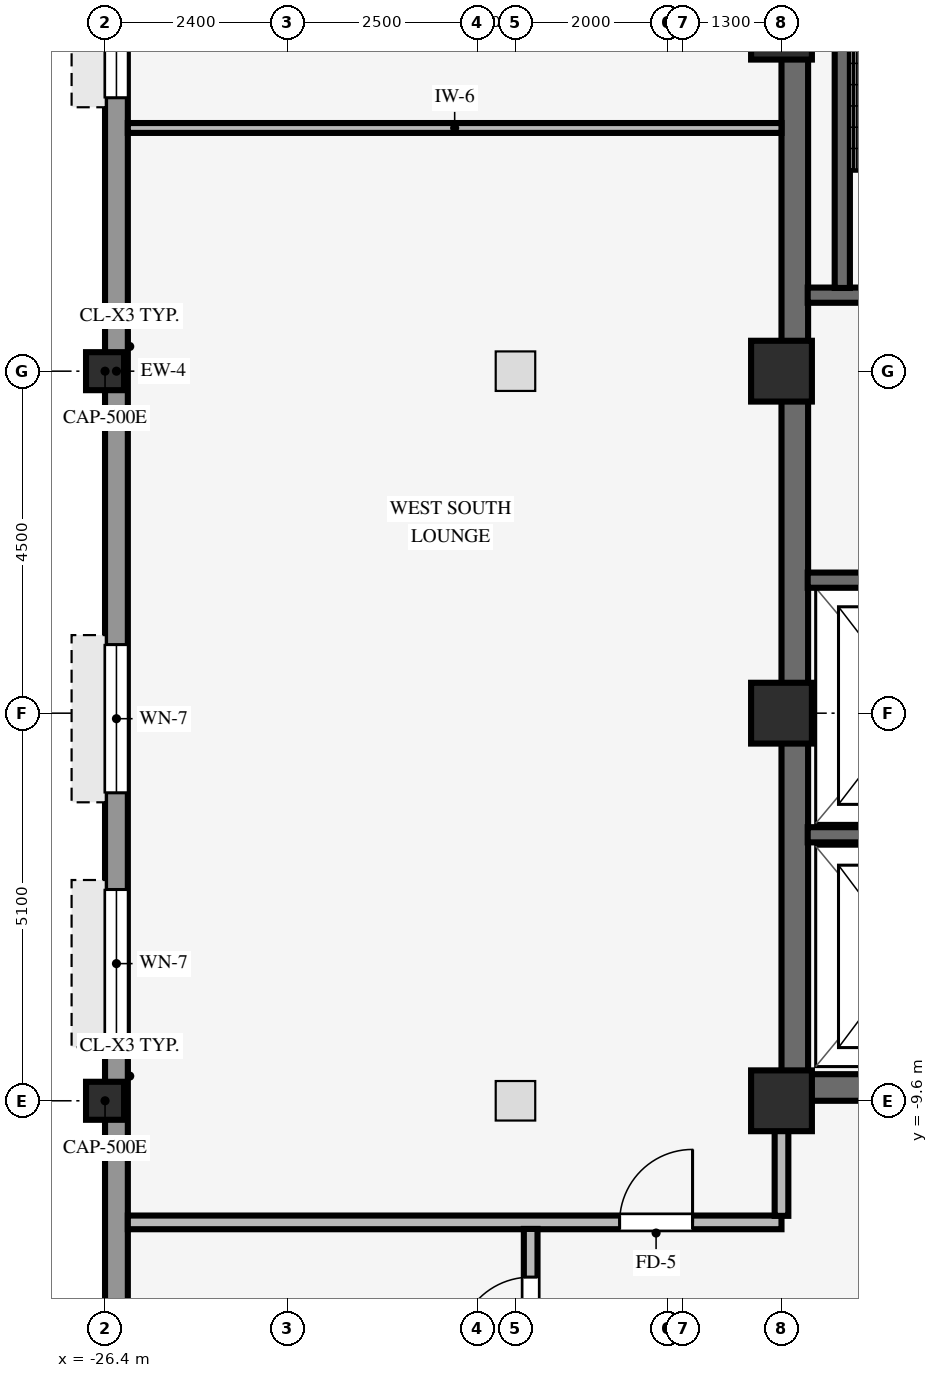
"""IFC4 building model, lengths in metres.
Left out: names, types, materials, properties, quantities, classifications, styles, units other than length and angle.
Written with IfcOpenShell. Run it as: python <this file> out.ifc"""

import sys

from ifc_helpers import new_model, si_unit, direction, frame, frame_2d, origin, origin_2d, place, context, subcontext, project, spatial, rectangle, hollow_rectangle, extrude, source, transform, mapped, element, fill, save


model = new_model("IFC4")
c1 = context("Model", 3, precision=1e-05, world=origin(), true_north=direction((0.0, 1.0)))
c2 = subcontext(c1, "Body", "Model", "MODEL_VIEW")
j1 = project(units=[si_unit("LENGTHUNIT", "METRE"), si_unit("PLANEANGLEUNIT", "RADIAN")], contexts=[c1])
p1 = place(None, origin())
s1 = spatial("IfcSite", under=j1, at=p1, CompositionType="ELEMENT")
p2 = place(p1, origin())
s2 = spatial("IfcBuilding", under=s1, at=p2, CompositionType="ELEMENT")
p3 = place(p2, frame((0.0, 0.0, 242.0)))
s3 = spatial("IfcBuildingStorey", under=s2, at=p3, CompositionType="ELEMENT", Elevation=242.0)
p4 = place(p3, frame((-17.5, -9.425, 0.0), z_axis=(0.0, 0.0, 1.0), x_axis=(1.0, 0.0, 0.0)))
e1 = element("IfcWall", 1, at=p4, inside=s3, PredefinedType="SHEAR", context=c2, shape_type="SweptSolid", body=[
    extrude(rectangle(XDim=8.5, YDim=0.35, at=frame_2d((4.25, 0.0))), origin(), (0.0, 0.0, 1.0), 3.25),
])
p5 = place(p3, frame((-17.325, -9.255, 0.0), z_axis=(0.0, 0.0, 1.0), x_axis=(0.0, 1.0, 0.0)))
e2 = element("IfcWall", 2, at=p5, inside=s3, PredefinedType="SHEAR", context=c2, shape_type="SweptSolid", body=[
    extrude(rectangle(XDim=18.51, YDim=0.35, at=frame_2d((9.255, 0.0))), origin(), (0.0, 0.0, 1.0), 3.25),
])
for number, where, z_axis, x_axis in (
    (3, (-17.5, -9.6, 0.0), (0.0, 0.0, 1.0), (1.0, 0.0, 0.0)),
    (4, (-17.5, -4.5, 0.0), (0.0, 0.0, 1.0), (1.0, 0.0, 0.0)),
    (5, (-17.5, 4.5, 0.0), (0.0, 0.0, 1.0), (1.0, 0.0, 0.0)),
    (6, (-17.5, 0.0, 0.0), (0.0, 0.0, 1.0), (1.0, 0.0, 0.0)),
):
    element("IfcColumn", number, at=place(p3, frame(where, z_axis=z_axis, x_axis=x_axis)), inside=s3, PredefinedType="COLUMN", context=c2, shape_type="SweptSolid", body=[
        extrude(rectangle(XDim=0.8, YDim=0.8, at=origin_2d()), origin(), (0.0, 0.0, 1.0), 3.25),
    ])
for number, where, z_axis, x_axis in (
    (7, (-26.4, -9.6, 0.0), (0.0, 0.0, 1.0), (1.0, 0.0, 0.0)),
    (8, (-26.4, 0.0, 0.0), (0.0, 0.0, 1.0), (1.0, 0.0, 0.0)),
):
    element("IfcColumn", number, at=place(p3, frame(where, z_axis=z_axis, x_axis=x_axis)), inside=s3, PredefinedType="COLUMN", context=c2, shape_type="SweptSolid", body=[
        extrude(hollow_rectangle(XDim=0.5, YDim=0.5, WallThickness=0.032, InnerFilletRadius=0.032, OuterFilletRadius=0.064, at=origin_2d()), origin(), (0.0, 0.0, 1.0), 3.25),
    ])
p6 = place(p3, frame((-26.25, -17.004, 0.0), z_axis=(0.0, 0.0, 1.0), x_axis=(0.0, 1.0, 0.0)))
e9 = element("IfcWall", 9, at=p6, inside=s3, PredefinedType="STANDARD", context=c2, shape_type="SweptSolid", body=[
    extrude(rectangle(XDim=34.008, YDim=0.3, at=frame_2d((17.004, 0.0))), origin(), (0.0, 0.0, 1.0), 2.812),
])
p7 = place(p6, frame((2.311, 0.0, 0.8)))
e10 = element("IfcOpeningElement", 10, at=p7, cuts=e9, PredefinedType="OPENING", context=c2, shape_type="SweptSolid", body=[
    extrude(rectangle(XDim=1.95, YDim=1.48, at=frame_2d((0.975, 0.74))), frame((0.0, 0.16, 0.0), z_axis=(0.0, -1.0, 0.0), x_axis=(1.0, 0.0, 0.0)), (0.0, 0.0, 1.0), 0.32),
])
p8 = place(p6, frame((8.234, 0.0, 0.8)))
e11 = element("IfcOpeningElement", 11, at=p8, cuts=e9, PredefinedType="OPENING", context=c2, shape_type="SweptSolid", body=[
    extrude(rectangle(XDim=1.95, YDim=1.48, at=frame_2d((0.975, 0.74))), frame((0.0, 0.16, 0.0), z_axis=(0.0, -1.0, 0.0), x_axis=(1.0, 0.0, 0.0)), (0.0, 0.0, 1.0), 0.32),
])
p9 = place(p6, frame((11.456, 0.0, 0.8)))
e12 = element("IfcOpeningElement", 12, at=p9, cuts=e9, PredefinedType="OPENING", context=c2, shape_type="SweptSolid", body=[
    extrude(rectangle(XDim=1.95, YDim=1.48, at=frame_2d((0.975, 0.74))), frame((0.0, 0.16, 0.0), z_axis=(0.0, -1.0, 0.0), x_axis=(1.0, 0.0, 0.0)), (0.0, 0.0, 1.0), 0.32),
])
p10 = place(p6, frame((20.602, 0.0, 0.8)))
e13 = element("IfcOpeningElement", 13, at=p10, cuts=e9, PredefinedType="OPENING", context=c2, shape_type="SweptSolid", body=[
    extrude(rectangle(XDim=1.95, YDim=1.48, at=frame_2d((0.975, 0.74))), frame((0.0, 0.16, 0.0), z_axis=(0.0, -1.0, 0.0), x_axis=(1.0, 0.0, 0.0)), (0.0, 0.0, 1.0), 0.32),
])
p11 = place(p6, frame((23.824, 0.0, 0.8)))
e14 = element("IfcOpeningElement", 14, at=p11, cuts=e9, PredefinedType="OPENING", context=c2, shape_type="SweptSolid", body=[
    extrude(rectangle(XDim=1.95, YDim=1.48, at=frame_2d((0.975, 0.74))), frame((0.0, 0.16, 0.0), z_axis=(0.0, -1.0, 0.0), x_axis=(1.0, 0.0, 0.0)), (0.0, 0.0, 1.0), 0.32),
])
p12 = place(p6, frame((29.747, 0.0, 0.8)))
e15 = element("IfcOpeningElement", 15, at=p12, cuts=e9, PredefinedType="OPENING", context=c2, shape_type="SweptSolid", body=[
    extrude(rectangle(XDim=1.95, YDim=1.48, at=frame_2d((0.975, 0.74))), frame((0.0, 0.16, 0.0), z_axis=(0.0, -1.0, 0.0), x_axis=(1.0, 0.0, 0.0)), (0.0, 0.0, 1.0), 0.32),
])
p13 = place(p3, frame((-17.155, 1.0, 0.0), z_axis=(0.0, 0.0, 1.0), x_axis=(1.0, 0.0, 0.0)))
e16 = element("IfcWall", 16, at=p13, inside=s3, PredefinedType="SHEAR", context=c2, shape_type="SweptSolid", body=[
    extrude(rectangle(XDim=3.62, YDim=0.2, at=frame_2d((1.81, 0.0))), origin(), (0.0, 0.0, 1.0), 3.25),
])
p14 = place(p3, frame((-16.7, 1.095, 0.0), z_axis=(0.0, 0.0, 1.0), x_axis=(0.0, 1.0, 0.0)))
e17 = element("IfcWall", 17, at=p14, inside=s3, PredefinedType="SHEAR", context=c2, shape_type="SweptSolid", body=[
    extrude(rectangle(XDim=8.16, YDim=0.2, at=frame_2d((4.08, 0.0))), origin(), (0.0, 0.0, 1.0), 3.25),
])
p15 = place(p3, frame((-17.155, -6.1, 0.0), z_axis=(0.0, 0.0, 1.0), x_axis=(1.0, 0.0, 0.0)))
e18 = element("IfcWall", 18, at=p15, inside=s3, PredefinedType="SHEAR", context=c2, shape_type="SweptSolid", body=[
    extrude(rectangle(XDim=2.905, YDim=0.2, at=frame_2d((1.453, 0.0))), origin(), (0.0, 0.0, 1.0), 3.25),
])
p16 = place(p3, frame((-17.155, -2.75, 0.0), z_axis=(0.0, 0.0, 1.0), x_axis=(1.0, 0.0, 0.0)))
e19 = element("IfcWall", 19, at=p16, inside=s3, PredefinedType="SHEAR", context=c2, shape_type="SweptSolid", body=[
    extrude(rectangle(XDim=2.71, YDim=0.2, at=frame_2d((1.355, 0.0))), origin(), (0.0, 0.0, 1.0), 3.25),
])
p17 = place(p3, frame((-26.1, -11.2, 0.0), z_axis=(0.0, 0.0, 1.0), x_axis=(1.0, 0.0, 0.0)))
e20 = element("IfcWall", 20, at=p17, inside=s3, PredefinedType="PARTITIONING", context=c2, shape_type="SweptSolid", body=[
    extrude(rectangle(XDim=8.6, YDim=0.18, at=frame_2d((4.3, 0.0))), origin(), (0.0, 0.0, 1.0), 3.24),
])
p18 = place(p17, frame((6.47, 0.0, 0.0)))
e21 = element("IfcOpeningElement", 21, at=p18, cuts=e20, PredefinedType="OPENING", context=c2, shape_type="SweptSolid", body=[
    extrude(rectangle(XDim=0.96, YDim=2.1, at=frame_2d((0.48, 1.05))), frame((0.0, 0.1, 0.0), z_axis=(0.0, -1.0, 0.0), x_axis=(1.0, 0.0, 0.0)), (0.0, 0.0, 1.0), 0.2),
])
p19 = place(p3, frame((-26.1, 3.2, 0.0), z_axis=(0.0, 0.0, 1.0), x_axis=(1.0, 0.0, 0.0)))
e22 = element("IfcWall", 22, at=p19, inside=s3, PredefinedType="PARTITIONING", context=c2, shape_type="SweptSolid", body=[
    extrude(rectangle(XDim=8.6, YDim=0.13, at=frame_2d((4.3, 0.0))), origin(), (0.0, 0.0, 1.0), 3.24),
])
p20 = place(p3, frame((-20.8, -13.514, 0.0), z_axis=(0.0, 0.0, 1.0), x_axis=(0.0, 1.0, 0.0)))
e23 = element("IfcWall", 23, at=p20, inside=s3, PredefinedType="PARTITIONING", context=c2, shape_type="SweptSolid", body=[
    extrude(rectangle(XDim=2.228, YDim=0.18, at=frame_2d((1.114, 0.0))), origin(), (0.0, 0.0, 1.0), 2.585),
])
p21 = place(p20, frame((0.634, 0.0, 0.0)))
e24 = element("IfcOpeningElement", 24, at=p21, cuts=e23, PredefinedType="OPENING", context=c2, shape_type="SweptSolid", body=[
    extrude(rectangle(XDim=0.96, YDim=2.1, at=frame_2d((0.48, 1.05))), frame((0.0, 0.1, 0.0), z_axis=(0.0, -1.0, 0.0), x_axis=(1.0, 0.0, 0.0)), (0.0, 0.0, 1.0), 0.2),
])
p22 = place(p3, frame((-17.5, -11.114, 0.0), z_axis=(0.0, 0.0, 1.0), x_axis=(0.0, 1.0, 0.0)))
e25 = element("IfcWall", 25, at=p22, inside=s3, PredefinedType="PARTITIONING", context=c2, shape_type="SweptSolid", body=[
    extrude(rectangle(XDim=1.118, YDim=0.18, at=frame_2d((0.559, 0.0))), origin(), (0.0, 0.0, 1.0), 2.772),
])
m1 = source(origin(), c2, "Body", "SweptSolid", [
    extrude(rectangle(XDim=1.95, YDim=1.48, at=frame_2d((0.975, 0.74))), frame((0.0, 0.03, 0.0), z_axis=(0.0, -1.0, 0.0), x_axis=(1.0, 0.0, 0.0)), (0.0, 0.0, 1.0), 0.06),
])
p23 = place(p8, origin())
e26 = element("IfcWindow", 26, at=p23, inside=s3, PartitioningType="SINGLE_PANEL", PredefinedType="WINDOW", context=c2, shape_type="MappedRepresentation", body=[
    mapped(m1, transform((0.0, 0.0, 0.0), scale=1.0)),
])
fill(e11, e26)
p24 = place(p9, origin())
e27 = element("IfcWindow", 27, at=p24, inside=s3, PartitioningType="SINGLE_PANEL", PredefinedType="WINDOW", context=c2, shape_type="MappedRepresentation", body=[
    mapped(m1, transform((0.0, 0.0, 0.0), scale=1.0)),
])
fill(e12, e27)
p25 = place(p10, origin())
e28 = element("IfcWindow", 28, at=p25, inside=s3, PartitioningType="SINGLE_PANEL", PredefinedType="WINDOW", context=c2, shape_type="MappedRepresentation", body=[
    mapped(m1, transform((0.0, 0.0, 0.0), scale=1.0)),
])
fill(e13, e28)
m2 = source(origin(), c2, "Body", "SweptSolid", [
    extrude(rectangle(XDim=0.96, YDim=2.1, at=frame_2d((0.48, 1.05))), frame((0.0, 0.025, 0.0), z_axis=(0.0, -1.0, 0.0), x_axis=(1.0, 0.0, 0.0)), (0.0, 0.0, 1.0), 0.05),
])
p26 = place(p18, origin())
e29 = element("IfcDoor", 29, at=p26, inside=s3, OperationType="SINGLE_SWING_RIGHT", PredefinedType="DOOR", context=c2, shape_type="MappedRepresentation", body=[
    mapped(m2, transform((0.0, 0.0, 0.0), scale=1.0)),
])
fill(e21, e29)
p27 = place(p21, origin())
e30 = element("IfcDoor", 30, at=p27, inside=s3, OperationType="SINGLE_SWING_LEFT", PredefinedType="DOOR", context=c2, shape_type="MappedRepresentation", body=[
    mapped(m2, transform((0.0, 0.0, 0.0), scale=1.0)),
])
fill(e24, e30)
save(model, sys.argv[1])
